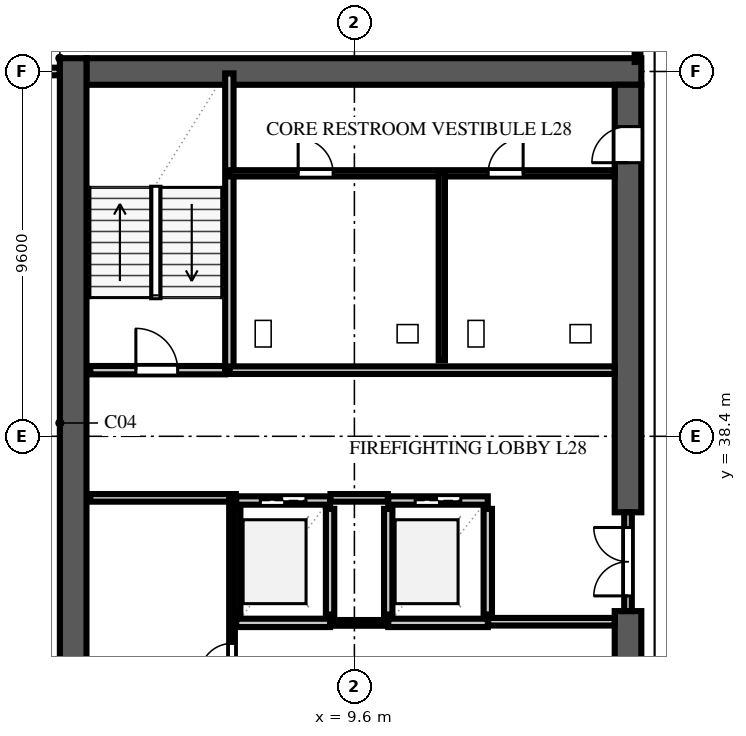
"""IFC4 building model, lengths in metres.
Left out: names, types, materials, properties, quantities, classifications, styles, units other than length and angle.
Written with IfcOpenShell. Run it as: python <this file> out.ifc"""

import sys

from ifc_helpers import new_model, si_unit, direction, frame, frame_2d, origin, place, context, subcontext, project, spatial, rectangle, extrude, element, fill, save


model = new_model("IFC4")
c1 = context("Model", 3, precision=1e-05, world=origin(), true_north=direction((0.0, 1.0)))
c2 = subcontext(c1, "Body", "Model", "MODEL_VIEW")
j1 = project(units=[si_unit("LENGTHUNIT", "METRE"), si_unit("PLANEANGLEUNIT", "RADIAN")], contexts=[c1])
p1 = place(None, origin())
s1 = spatial("IfcSite", under=j1, at=p1, CompositionType="ELEMENT")
p2 = place(p1, origin())
s2 = spatial("IfcBuilding", under=s1, at=p2, CompositionType="ELEMENT")
p3 = place(p2, frame((0.0, 0.0, 112.8)))
s3 = spatial("IfcBuildingStorey", under=s2, at=p3, CompositionType="ELEMENT", Elevation=112.8)
p4 = place(p3, frame((2.55, 48.0, 0.0), z_axis=(0.0, 0.0, 1.0), x_axis=(1.0, 0.0, 0.0)))
e1 = element("IfcWall", 1, at=p4, inside=s3, PredefinedType="SHEAR", context=c2, shape_type="SweptSolid", body=[
    extrude(rectangle(XDim=14.6, YDim=0.7, at=frame_2d((7.3, 0.0))), origin(), (0.0, 0.0, 1.0), 3.54),
])
p5 = place(p3, frame((2.2, 9.25, 0.0), z_axis=(0.0, 0.0, 1.0), x_axis=(0.0, 1.0, 0.0)))
e2 = element("IfcWall", 2, at=p5, inside=s3, PredefinedType="SHEAR", context=c2, shape_type="SweptSolid", body=[
    extrude(rectangle(XDim=39.1, YDim=0.7, at=frame_2d((19.55, 0.0))), origin(), (0.0, 0.0, 1.0), 3.54),
])
p6 = place(p3, frame((16.8, 26.0, 0.0), z_axis=(0.0, 0.0, 1.0), x_axis=(0.0, 1.0, 0.0)))
e3 = element("IfcWall", 3, at=p6, inside=s3, PredefinedType="SHEAR", context=c2, shape_type="SweptSolid", body=[
    extrude(rectangle(XDim=7.8, YDim=0.7, at=frame_2d((3.9, 0.0))), origin(), (0.0, 0.0, 1.0), 3.54),
])
p7 = place(p3, frame((16.8, 36.4, 0.0), z_axis=(0.0, 0.0, 1.0), x_axis=(0.0, 1.0, 0.0)))
e4 = element("IfcWall", 4, at=p7, inside=s3, PredefinedType="SHEAR", context=c2, shape_type="SweptSolid", body=[
    extrude(rectangle(XDim=11.25, YDim=0.7, at=frame_2d((5.625, 0.0))), origin(), (0.0, 0.0, 1.0), 3.54),
])
p8 = place(p7, frame((9.2, 0.0, 0.0)))
e5 = element("IfcOpeningElement", 5, at=p8, cuts=e4, PredefinedType="OPENING", context=c2, shape_type="SweptSolid", body=[
    extrude(rectangle(XDim=0.95, YDim=2.15, at=frame_2d((0.475, 1.075))), frame((0.0, 0.362, 0.0), z_axis=(0.0, -1.0, 0.0), x_axis=(1.0, 0.0, 0.0)), (0.0, 0.0, 1.0), 0.724),
])
p9 = place(p3, frame((2.65, 40.14, 0.0), z_axis=(0.0, 0.0, 1.0), x_axis=(1.0, 0.0, 0.0)))
e6 = element("IfcWall", 6, at=p9, inside=s3, PredefinedType="SOLIDWALL", context=c2, shape_type="SweptSolid", body=[
    extrude(rectangle(XDim=3.55, YDim=0.22, at=frame_2d((1.775, 0.0))), origin(), (0.0, 0.0, 1.0), 3.54),
])
p10 = place(p9, frame((1.2, 0.0, 0.0)))
e7 = element("IfcOpeningElement", 7, at=p10, cuts=e6, PredefinedType="OPENING", context=c2, shape_type="SweptSolid", body=[
    extrude(rectangle(XDim=1.1, YDim=2.2, at=frame_2d((0.55, 1.1))), frame((0.0, 0.122, 0.0), z_axis=(0.0, -1.0, 0.0), x_axis=(1.0, 0.0, 0.0)), (0.0, 0.0, 1.0), 0.244),
])
p11 = place(p3, frame((6.31, 40.14, 0.0), z_axis=(0.0, 0.0, 1.0), x_axis=(0.0, 1.0, 0.0)))
e8 = element("IfcWall", 8, at=p11, inside=s3, PredefinedType="SOLIDWALL", context=c2, shape_type="SweptSolid", body=[
    extrude(rectangle(XDim=7.81, YDim=0.22, at=frame_2d((3.905, 0.0))), origin(), (0.0, 0.0, 1.0), 3.54),
])
for number, where, z_axis, x_axis in (
    (9, (6.49, 33.71, 0.0), (0.0, 0.0, 1.0), (0.0, 1.0, 0.0)),
    (10, (8.96, 33.71, 0.0), (0.0, 0.0, 1.0), (0.0, 1.0, 0.0)),
):
    element("IfcWall", number, at=place(p3, frame(where, z_axis=z_axis, x_axis=x_axis)), inside=s3, PredefinedType="SOLIDWALL", context=c2, shape_type="SweptSolid", body=[
        extrude(rectangle(XDim=2.78, YDim=0.22, at=frame_2d((1.39, 0.0))), origin(), (0.0, 0.0, 1.0), 3.54),
    ])
p12 = place(p3, frame((6.49, 33.49, 0.0), z_axis=(0.0, 0.0, 1.0), x_axis=(1.0, 0.0, 0.0)))
e11 = element("IfcWall", 11, at=p12, inside=s3, PredefinedType="SOLIDWALL", context=c2, shape_type="SweptSolid", body=[
    extrude(rectangle(XDim=2.47, YDim=0.22, at=frame_2d((1.235, 0.0))), origin(), (0.0, 0.0, 1.0), 3.54),
])
p13 = place(p3, frame((6.49, 36.71, 0.0), z_axis=(0.0, 0.0, 1.0), x_axis=(1.0, 0.0, 0.0)))
e12 = element("IfcWall", 12, at=p13, inside=s3, PredefinedType="SOLIDWALL", context=c2, shape_type="SweptSolid", body=[
    extrude(rectangle(XDim=2.47, YDim=0.22, at=frame_2d((1.235, 0.0))), origin(), (0.0, 0.0, 1.0), 3.54),
])
p14 = place(p13, frame((0.635, 0.0, 0.0)))
e13 = element("IfcOpeningElement", 13, at=p14, cuts=e12, PredefinedType="OPENING", context=c2, shape_type="SweptSolid", body=[
    extrude(rectangle(XDim=1.2, YDim=2.2, at=frame_2d((0.6, 1.1))), frame((0.0, 0.122, 0.0), z_axis=(0.0, -1.0, 0.0), x_axis=(1.0, 0.0, 0.0)), (0.0, 0.0, 1.0), 0.244),
])
for number, where, z_axis, x_axis in (
    (14, (10.49, 33.71, 0.0), (0.0, 0.0, 1.0), (0.0, 1.0, 0.0)),
    (15, (13.11, 33.71, 0.0), (0.0, 0.0, 1.0), (0.0, 1.0, 0.0)),
):
    element("IfcWall", number, at=place(p3, frame(where, z_axis=z_axis, x_axis=x_axis)), inside=s3, PredefinedType="SOLIDWALL", context=c2, shape_type="SweptSolid", body=[
        extrude(rectangle(XDim=2.78, YDim=0.22, at=frame_2d((1.39, 0.0))), origin(), (0.0, 0.0, 1.0), 3.54),
    ])
p15 = place(p3, frame((10.49, 33.49, 0.0), z_axis=(0.0, 0.0, 1.0), x_axis=(1.0, 0.0, 0.0)))
e16 = element("IfcWall", 16, at=p15, inside=s3, PredefinedType="SOLIDWALL", context=c2, shape_type="SweptSolid", body=[
    extrude(rectangle(XDim=2.62, YDim=0.22, at=frame_2d((1.31, 0.0))), origin(), (0.0, 0.0, 1.0), 3.54),
])
p16 = place(p3, frame((10.49, 36.71, 0.0), z_axis=(0.0, 0.0, 1.0), x_axis=(1.0, 0.0, 0.0)))
e17 = element("IfcWall", 17, at=p16, inside=s3, PredefinedType="SOLIDWALL", context=c2, shape_type="SweptSolid", body=[
    extrude(rectangle(XDim=2.62, YDim=0.22, at=frame_2d((1.31, 0.0))), origin(), (0.0, 0.0, 1.0), 3.54),
])
p17 = place(p16, frame((0.71, 0.0, 0.0)))
e18 = element("IfcOpeningElement", 18, at=p17, cuts=e17, PredefinedType="OPENING", context=c2, shape_type="SweptSolid", body=[
    extrude(rectangle(XDim=1.2, YDim=2.2, at=frame_2d((0.6, 1.1))), frame((0.0, 0.122, 0.0), z_axis=(0.0, -1.0, 0.0), x_axis=(1.0, 0.0, 0.0)), (0.0, 0.0, 1.0), 0.244),
])
p18 = place(p3, frame((2.65, 36.78, 0.0), z_axis=(0.0, 0.0, 1.0), x_axis=(1.0, 0.0, 0.0)))
e19 = element("IfcWall", 19, at=p18, inside=s3, PredefinedType="SOLIDWALL", context=c2, shape_type="SweptSolid", body=[
    extrude(rectangle(XDim=3.83, YDim=0.2, at=frame_2d((1.915, 0.0))), origin(), (0.0, 0.0, 1.0), 3.54),
])
p19 = place(p3, frame((8.97, 36.78, 0.0), z_axis=(0.0, 0.0, 1.0), x_axis=(1.0, 0.0, 0.0)))
e20 = element("IfcWall", 20, at=p19, inside=s3, PredefinedType="SOLIDWALL", context=c2, shape_type="SweptSolid", body=[
    extrude(rectangle(XDim=1.51, YDim=0.2, at=frame_2d((0.755, 0.0))), origin(), (0.0, 0.0, 1.0), 3.54),
])
p20 = place(p3, frame((13.12, 33.52, 0.0), z_axis=(0.0, 0.0, 1.0), x_axis=(1.0, 0.0, 0.0)))
e21 = element("IfcWall", 21, at=p20, inside=s3, PredefinedType="SOLIDWALL", context=c2, shape_type="SweptSolid", body=[
    extrude(rectangle(XDim=3.33, YDim=0.2, at=frame_2d((1.665, 0.0))), origin(), (0.0, 0.0, 1.0), 3.54),
])
p21 = place(p3, frame((6.32, 40.14, 0.0), z_axis=(0.0, 0.0, 1.0), x_axis=(1.0, 0.0, 0.0)))
e22 = element("IfcWall", 22, at=p21, inside=s3, PredefinedType="SOLIDWALL", context=c2, shape_type="SweptSolid", body=[
    extrude(rectangle(XDim=10.13, YDim=0.2, at=frame_2d((5.065, 0.0))), origin(), (0.0, 0.0, 1.0), 3.54),
])
p22 = place(p3, frame((16.8, 33.8, 0.0), z_axis=(0.0, 0.0, 1.0), x_axis=(0.0, 1.0, 0.0)))
e23 = element("IfcWall", 23, at=p22, inside=s3, PredefinedType="SOLIDWALL", context=c2, shape_type="SweptSolid", body=[
    extrude(rectangle(XDim=2.6, YDim=0.2, at=frame_2d((1.3, 0.0))), origin(), (0.0, 0.0, 1.0), 3.54),
])
p23 = place(p22, frame((0.4, 0.0, 0.0)))
e24 = element("IfcOpeningElement", 24, at=p23, cuts=e23, PredefinedType="OPENING", context=c2, shape_type="SweptSolid", body=[
    extrude(rectangle(XDim=1.8, YDim=2.2, at=frame_2d((0.9, 1.1))), frame((0.0, 0.112, 0.0), z_axis=(0.0, -1.0, 0.0), x_axis=(1.0, 0.0, 0.0)), (0.0, 0.0, 1.0), 0.224),
])
p24 = place(p3, frame((8.965, 33.49, 0.0), z_axis=(0.0, 0.0, 1.0), x_axis=(1.0, 0.0, 0.0)))
e25 = element("IfcWall", 25, at=p24, inside=s3, PredefinedType="PARTITIONING", context=c2, shape_type="SweptSolid", body=[
    extrude(rectangle(XDim=1.52, YDim=0.15, at=frame_2d((0.76, 0.0))), origin(), (0.0, 0.0, 1.0), 3.54),
])
p25 = place(p3, frame((6.38, 17.8, 0.0), z_axis=(0.0, 0.0, 1.0), x_axis=(0.0, 1.0, 0.0)))
e26 = element("IfcWall", 26, at=p25, inside=s3, PredefinedType="PARTITIONING", context=c2, shape_type="SweptSolid", body=[
    extrude(rectangle(XDim=18.98, YDim=0.15, at=frame_2d((9.49, 0.0))), origin(), (0.0, 0.0, 1.0), 3.54),
])
p26 = place(p25, frame((14.3, 0.0, 0.0)))
e27 = element("IfcOpeningElement", 27, at=p26, cuts=e26, PredefinedType="OPENING", context=c2, shape_type="SweptSolid", body=[
    extrude(rectangle(XDim=0.85, YDim=2.1, at=frame_2d((0.425, 1.05))), frame((0.0, 0.087, 0.0), z_axis=(0.0, -1.0, 0.0), x_axis=(1.0, 0.0, 0.0)), (0.0, 0.0, 1.0), 0.174),
])
p27 = place(p3, frame((6.32, 45.32, 0.0), z_axis=(0.0, 0.0, 1.0), x_axis=(1.0, 0.0, 0.0)))
e28 = element("IfcWall", 28, at=p27, inside=s3, PredefinedType="PLUMBINGWALL", context=c2, shape_type="SweptSolid", body=[
    extrude(rectangle(XDim=10.13, YDim=0.165, at=frame_2d((5.065, 0.0))), origin(), (0.0, 0.0, 1.0), 3.54),
])
p28 = place(p27, frame((1.8, 0.0, 0.0)))
e29 = element("IfcOpeningElement", 29, at=p28, cuts=e28, PredefinedType="OPENING", context=c2, shape_type="SweptSolid", body=[
    extrude(rectangle(XDim=0.92, YDim=2.15, at=frame_2d((0.46, 1.075))), frame((0.0, 0.094, 0.0), z_axis=(0.0, -1.0, 0.0), x_axis=(1.0, 0.0, 0.0)), (0.0, 0.0, 1.0), 0.189),
])
p29 = place(p27, frame((6.8, 0.0, 0.0)))
e30 = element("IfcOpeningElement", 30, at=p29, cuts=e28, PredefinedType="OPENING", context=c2, shape_type="SweptSolid", body=[
    extrude(rectangle(XDim=0.92, YDim=2.15, at=frame_2d((0.46, 1.075))), frame((0.0, 0.094, 0.0), z_axis=(0.0, -1.0, 0.0), x_axis=(1.0, 0.0, 0.0)), (0.0, 0.0, 1.0), 0.189),
])
p30 = place(p3, frame((11.9, 40.4, 0.0), z_axis=(0.0, 0.0, 1.0), x_axis=(0.0, 1.0, 0.0)))
e31 = element("IfcWall", 31, at=p30, inside=s3, PredefinedType="PLUMBINGWALL", context=c2, shape_type="SweptSolid", body=[
    extrude(rectangle(XDim=4.92, YDim=0.165, at=frame_2d((2.46, 0.0))), origin(), (0.0, 0.0, 1.0), 3.54),
])
p31 = place(p3, frame((0.85, 48.0, 0.0), z_axis=(0.0, 0.0, 1.0), x_axis=(1.0, 0.0, 0.0)))
e32 = element("IfcWall", 32, at=p31, inside=s3, PredefinedType="SOLIDWALL", context=c2, shape_type="SweptSolid", body=[
    extrude(rectangle(XDim=0.995, YDim=0.2, at=frame_2d((0.498, 0.0))), origin(), (0.0, 0.0, 1.0), 3.54),
])
p32 = place(p3, frame((17.05, 48.25, 0.0), z_axis=(0.0, 0.0, 1.0), x_axis=(0.0, 1.0, 0.0)))
e33 = element("IfcWall", 33, at=p32, inside=s3, PredefinedType="PARTITIONING", context=c2, shape_type="SweptSolid", body=[
    extrude(rectangle(XDim=18.73, YDim=0.15, at=frame_2d((9.365, 0.0))), origin(), (0.0, 0.0, 1.0), 3.54),
])
p33 = place(p32, frame((3.4, 0.0, 0.0)))
e34 = element("IfcOpeningElement", 34, at=p33, cuts=e33, PredefinedType="OPENING", context=c2, shape_type="SweptSolid", body=[
    extrude(rectangle(XDim=0.95, YDim=2.15, at=frame_2d((0.475, 1.075))), frame((0.0, 0.087, 0.0), z_axis=(0.0, -1.0, 0.0), x_axis=(1.0, 0.0, 0.0)), (0.0, 0.0, 1.0), 0.174),
])
p34 = place(p10, origin())
e35 = element("IfcDoor", 35, at=p34, inside=s3, OperationType="SINGLE_SWING_LEFT", PredefinedType="DOOR", context=c2, shape_type="SweptSolid", body=[
    extrude(rectangle(XDim=1.1, YDim=2.2, at=frame_2d((0.55, 1.1))), frame((0.0, 0.025, 0.0), z_axis=(0.0, -1.0, 0.0), x_axis=(1.0, 0.0, 0.0)), (0.0, 0.0, 1.0), 0.05),
])
fill(e7, e35)
p35 = place(p14, origin())
e36 = element("IfcDoor", 36, at=p35, inside=s3, OperationType="DOUBLE_DOOR_SLIDING", PredefinedType="DOOR", context=c2, shape_type="SweptSolid", body=[
    extrude(rectangle(XDim=1.2, YDim=2.2, at=frame_2d((0.6, 1.1))), frame((0.0, 0.025, 0.0), z_axis=(0.0, -1.0, 0.0), x_axis=(1.0, 0.0, 0.0)), (0.0, 0.0, 1.0), 0.05),
])
fill(e13, e36)
p36 = place(p17, origin())
e37 = element("IfcDoor", 37, at=p36, inside=s3, OperationType="DOUBLE_DOOR_SLIDING", PredefinedType="DOOR", context=c2, shape_type="SweptSolid", body=[
    extrude(rectangle(XDim=1.2, YDim=2.2, at=frame_2d((0.6, 1.1))), frame((0.0, 0.025, 0.0), z_axis=(0.0, -1.0, 0.0), x_axis=(1.0, 0.0, 0.0)), (0.0, 0.0, 1.0), 0.05),
])
fill(e18, e37)
p37 = place(p8, origin())
e38 = element("IfcDoor", 38, at=p37, inside=s3, OperationType="SINGLE_SWING_LEFT", PredefinedType="DOOR", context=c2, shape_type="SweptSolid", body=[
    extrude(rectangle(XDim=0.95, YDim=2.15, at=frame_2d((0.475, 1.075))), frame((0.0, 0.025, 0.0), z_axis=(0.0, -1.0, 0.0), x_axis=(1.0, 0.0, 0.0)), (0.0, 0.0, 1.0), 0.05),
])
fill(e5, e38)
p38 = place(p23, origin())
e39 = element("IfcDoor", 39, at=p38, inside=s3, OperationType="DOUBLE_DOOR_SINGLE_SWING", PredefinedType="DOOR", context=c2, shape_type="SweptSolid", body=[
    extrude(rectangle(XDim=1.8, YDim=2.2, at=frame_2d((0.9, 1.1))), frame((0.0, 0.025, 0.0), z_axis=(0.0, -1.0, 0.0), x_axis=(1.0, 0.0, 0.0)), (0.0, 0.0, 1.0), 0.05),
])
fill(e24, e39)
p39 = place(p26, origin())
e40 = element("IfcDoor", 40, at=p39, inside=s3, OperationType="SINGLE_SWING_LEFT", PredefinedType="DOOR", context=c2, shape_type="SweptSolid", body=[
    extrude(rectangle(XDim=0.85, YDim=2.1, at=frame_2d((0.425, 1.05))), frame((0.0, 0.025, 0.0), z_axis=(0.0, -1.0, 0.0), x_axis=(1.0, 0.0, 0.0)), (0.0, 0.0, 1.0), 0.05),
])
fill(e27, e40)
p40 = place(p28, origin())
e41 = element("IfcDoor", 41, at=p40, inside=s3, OperationType="SINGLE_SWING_LEFT", PredefinedType="DOOR", context=c2, shape_type="SweptSolid", body=[
    extrude(rectangle(XDim=0.92, YDim=2.15, at=frame_2d((0.46, 1.075))), frame((0.0, 0.025, 0.0), z_axis=(0.0, -1.0, 0.0), x_axis=(1.0, 0.0, 0.0)), (0.0, 0.0, 1.0), 0.05),
])
fill(e29, e41)
p41 = place(p29, origin())
e42 = element("IfcDoor", 42, at=p41, inside=s3, OperationType="SINGLE_SWING_RIGHT", PredefinedType="DOOR", context=c2, shape_type="SweptSolid", body=[
    extrude(rectangle(XDim=0.92, YDim=2.15, at=frame_2d((0.46, 1.075))), frame((0.0, 0.025, 0.0), z_axis=(0.0, -1.0, 0.0), x_axis=(1.0, 0.0, 0.0)), (0.0, 0.0, 1.0), 0.05),
])
fill(e30, e42)
save(model, sys.argv[1])
